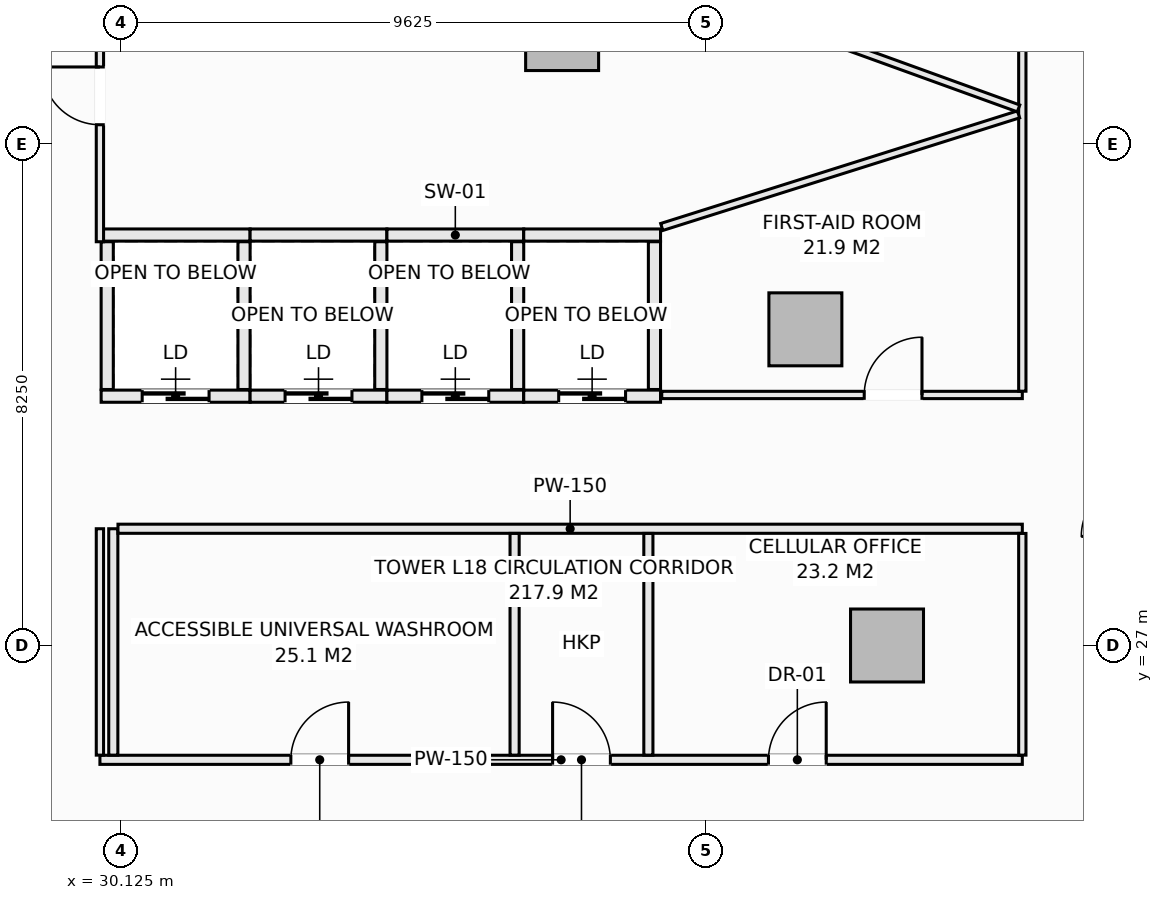
"""IFC4 building model, lengths in metres.
Left out: names, types, materials, properties, quantities, classifications, styles, units other than length and angle.
Written with IfcOpenShell. Run it as: python <this file> out.ifc"""

import sys

from ifc_helpers import new_model, si_unit, direction, frame, frame_2d, origin, origin_2d, place, context, subcontext, project, spatial, rectangle, extrude, element, fill, save


model = new_model("IFC4")
c1 = context("Model", 3, precision=1e-05, world=origin(), true_north=direction((0.0, 1.0)))
c2 = subcontext(c1, "Body", "Model", "MODEL_VIEW")
j1 = project(units=[si_unit("LENGTHUNIT", "METRE"), si_unit("PLANEANGLEUNIT", "RADIAN")], contexts=[c1])
p1 = place(None, origin())
s1 = spatial("IfcSite", under=j1, at=p1, CompositionType="ELEMENT")
p2 = place(p1, origin())
s2 = spatial("IfcBuilding", under=s1, at=p2, CompositionType="ELEMENT")
p3 = place(p2, frame((0.0, 0.0, 76.55)))
s3 = spatial("IfcBuildingStorey", under=s2, at=p3, CompositionType="ELEMENT", Elevation=76.55)
for number, where, z_axis, x_axis in (
    (1, (42.725, 27.0, -0.28), (0.0, 0.0, 1.0), (1.0, 0.0, 0.0)),
    (2, (41.382, 32.199, -0.28), (0.0, 0.0, 1.0), (1.0, 0.0, 0.0)),
    (3, (37.382, 37.055, -0.28), (0.0, 0.0, 1.0), (1.0, 0.0, 0.0)),
):
    element("IfcColumn", number, at=place(p3, frame(where, z_axis=z_axis, x_axis=x_axis)), inside=s3, PredefinedType="COLUMN", context=c2, shape_type="SweptSolid", body=[
        extrude(rectangle(XDim=1.2, YDim=1.2, at=origin_2d()), origin(), (0.0, 0.0, 1.0), 3.85),
    ])
p4 = place(p3, frame((29.8, 33.75, 0.0), z_axis=(0.0, 0.0, 1.0), x_axis=(1.0, 0.0, 0.0)))
e4 = element("IfcWall", 4, at=p4, inside=s3, PredefinedType="SOLIDWALL", context=c2, shape_type="SweptSolid", body=[
    extrude(rectangle(XDim=2.45, YDim=0.2, at=frame_2d((1.225, 0.0))), origin(), (0.0, 0.0, 1.0), 3.57),
])
p5 = place(p3, frame((29.8, 31.1, 0.0), z_axis=(0.0, 0.0, 1.0), x_axis=(1.0, 0.0, 0.0)))
e5 = element("IfcWall", 5, at=p5, inside=s3, PredefinedType="SOLIDWALL", context=c2, shape_type="SweptSolid", body=[
    extrude(rectangle(XDim=2.45, YDim=0.2, at=frame_2d((1.225, 0.0))), origin(), (0.0, 0.0, 1.0), 3.57),
])
p6 = place(p5, frame((0.675, 0.0, 0.0)))
e6 = element("IfcOpeningElement", 6, at=p6, cuts=e5, PredefinedType="OPENING", context=c2, shape_type="SweptSolid", body=[
    extrude(rectangle(XDim=1.1, YDim=2.2, at=frame_2d((0.55, 1.1))), frame((0.0, 0.11, 0.0), z_axis=(0.0, -1.0, 0.0), x_axis=(1.0, 0.0, 0.0)), (0.0, 0.0, 1.0), 0.22),
])
for number, where, z_axis, x_axis in (
    (7, (29.9, 31.21, 0.0), (0.0, 0.0, 1.0), (0.0, 1.0, 0.0)),
    (8, (32.15, 31.21, 0.0), (0.0, 0.0, 1.0), (0.0, 1.0, 0.0)),
):
    element("IfcWall", number, at=place(p3, frame(where, z_axis=z_axis, x_axis=x_axis)), inside=s3, PredefinedType="SOLIDWALL", context=c2, shape_type="SweptSolid", body=[
        extrude(rectangle(XDim=2.43, YDim=0.2, at=frame_2d((1.215, 0.0))), origin(), (0.0, 0.0, 1.0), 3.57),
    ])
p7 = place(p3, frame((32.25, 33.75, 0.0), z_axis=(0.0, 0.0, 1.0), x_axis=(1.0, 0.0, 0.0)))
e9 = element("IfcWall", 9, at=p7, inside=s3, PredefinedType="SOLIDWALL", context=c2, shape_type="SweptSolid", body=[
    extrude(rectangle(XDim=2.25, YDim=0.2, at=frame_2d((1.125, 0.0))), origin(), (0.0, 0.0, 1.0), 3.57),
])
p8 = place(p3, frame((32.25, 31.1, 0.0), z_axis=(0.0, 0.0, 1.0), x_axis=(1.0, 0.0, 0.0)))
e10 = element("IfcWall", 10, at=p8, inside=s3, PredefinedType="SOLIDWALL", context=c2, shape_type="SweptSolid", body=[
    extrude(rectangle(XDim=2.25, YDim=0.2, at=frame_2d((1.125, 0.0))), origin(), (0.0, 0.0, 1.0), 3.57),
])
p9 = place(p8, frame((0.575, 0.0, 0.0)))
e11 = element("IfcOpeningElement", 11, at=p9, cuts=e10, PredefinedType="OPENING", context=c2, shape_type="SweptSolid", body=[
    extrude(rectangle(XDim=1.1, YDim=2.2, at=frame_2d((0.55, 1.1))), frame((0.0, 0.11, 0.0), z_axis=(0.0, -1.0, 0.0), x_axis=(1.0, 0.0, 0.0)), (0.0, 0.0, 1.0), 0.22),
])
p10 = place(p3, frame((34.4, 31.21, 0.0), z_axis=(0.0, 0.0, 1.0), x_axis=(0.0, 1.0, 0.0)))
e12 = element("IfcWall", 12, at=p10, inside=s3, PredefinedType="SOLIDWALL", context=c2, shape_type="SweptSolid", body=[
    extrude(rectangle(XDim=2.43, YDim=0.2, at=frame_2d((1.215, 0.0))), origin(), (0.0, 0.0, 1.0), 3.57),
])
p11 = place(p3, frame((34.5, 33.75, 0.0), z_axis=(0.0, 0.0, 1.0), x_axis=(1.0, 0.0, 0.0)))
e13 = element("IfcWall", 13, at=p11, inside=s3, PredefinedType="SOLIDWALL", context=c2, shape_type="SweptSolid", body=[
    extrude(rectangle(XDim=2.25, YDim=0.2, at=frame_2d((1.125, 0.0))), origin(), (0.0, 0.0, 1.0), 3.57),
])
p12 = place(p3, frame((34.5, 31.1, 0.0), z_axis=(0.0, 0.0, 1.0), x_axis=(1.0, 0.0, 0.0)))
e14 = element("IfcWall", 14, at=p12, inside=s3, PredefinedType="SOLIDWALL", context=c2, shape_type="SweptSolid", body=[
    extrude(rectangle(XDim=2.25, YDim=0.2, at=frame_2d((1.125, 0.0))), origin(), (0.0, 0.0, 1.0), 3.57),
])
p13 = place(p12, frame((0.575, 0.0, 0.0)))
e15 = element("IfcOpeningElement", 15, at=p13, cuts=e14, PredefinedType="OPENING", context=c2, shape_type="SweptSolid", body=[
    extrude(rectangle(XDim=1.1, YDim=2.2, at=frame_2d((0.55, 1.1))), frame((0.0, 0.11, 0.0), z_axis=(0.0, -1.0, 0.0), x_axis=(1.0, 0.0, 0.0)), (0.0, 0.0, 1.0), 0.22),
])
p14 = place(p3, frame((36.65, 31.21, 0.0), z_axis=(0.0, 0.0, 1.0), x_axis=(0.0, 1.0, 0.0)))
e16 = element("IfcWall", 16, at=p14, inside=s3, PredefinedType="SOLIDWALL", context=c2, shape_type="SweptSolid", body=[
    extrude(rectangle(XDim=2.43, YDim=0.2, at=frame_2d((1.215, 0.0))), origin(), (0.0, 0.0, 1.0), 3.57),
])
p15 = place(p3, frame((36.75, 33.75, 0.0), z_axis=(0.0, 0.0, 1.0), x_axis=(1.0, 0.0, 0.0)))
e17 = element("IfcWall", 17, at=p15, inside=s3, PredefinedType="SOLIDWALL", context=c2, shape_type="SweptSolid", body=[
    extrude(rectangle(XDim=2.25, YDim=0.2, at=frame_2d((1.125, 0.0))), origin(), (0.0, 0.0, 1.0), 3.57),
])
p16 = place(p3, frame((36.75, 31.1, 0.0), z_axis=(0.0, 0.0, 1.0), x_axis=(1.0, 0.0, 0.0)))
e18 = element("IfcWall", 18, at=p16, inside=s3, PredefinedType="SOLIDWALL", context=c2, shape_type="SweptSolid", body=[
    extrude(rectangle(XDim=2.25, YDim=0.2, at=frame_2d((1.125, 0.0))), origin(), (0.0, 0.0, 1.0), 3.57),
])
p17 = place(p16, frame((0.575, 0.0, 0.0)))
e19 = element("IfcOpeningElement", 19, at=p17, cuts=e18, PredefinedType="OPENING", context=c2, shape_type="SweptSolid", body=[
    extrude(rectangle(XDim=1.1, YDim=2.2, at=frame_2d((0.55, 1.1))), frame((0.0, 0.11, 0.0), z_axis=(0.0, -1.0, 0.0), x_axis=(1.0, 0.0, 0.0)), (0.0, 0.0, 1.0), 0.22),
])
p18 = place(p3, frame((38.9, 31.21, 0.0), z_axis=(0.0, 0.0, 1.0), x_axis=(0.0, 1.0, 0.0)))
e20 = element("IfcWall", 20, at=p18, inside=s3, PredefinedType="SOLIDWALL", context=c2, shape_type="SweptSolid", body=[
    extrude(rectangle(XDim=2.43, YDim=0.2, at=frame_2d((1.215, 0.0))), origin(), (0.0, 0.0, 1.0), 3.57),
])
p19 = place(p3, frame((29.78, 25.12, 0.0), z_axis=(0.0, 0.0, 1.0), x_axis=(1.0, 0.0, 0.0)))
e21 = element("IfcWall", 21, at=p19, inside=s3, PredefinedType="PARTITIONING", context=c2, shape_type="SweptSolid", body=[
    extrude(rectangle(XDim=15.17, YDim=0.15, at=frame_2d((7.585, 0.0))), origin(), (0.0, 0.0, 1.0), 3.57),
])
p20 = place(p19, frame((3.14, 0.0, 0.0)))
e22 = element("IfcOpeningElement", 22, at=p20, cuts=e21, PredefinedType="OPENING", context=c2, shape_type="SweptSolid", body=[
    extrude(rectangle(XDim=0.95, YDim=2.1, at=frame_2d((0.475, 1.05))), frame((0.0, 0.085, 0.0), z_axis=(0.0, -1.0, 0.0), x_axis=(1.0, 0.0, 0.0)), (0.0, 0.0, 1.0), 0.17),
])
p21 = place(p19, frame((7.445, 0.0, 0.0)))
e23 = element("IfcOpeningElement", 23, at=p21, cuts=e21, PredefinedType="OPENING", context=c2, shape_type="SweptSolid", body=[
    extrude(rectangle(XDim=0.95, YDim=2.1, at=frame_2d((0.475, 1.05))), frame((0.0, 0.085, 0.0), z_axis=(0.0, -1.0, 0.0), x_axis=(1.0, 0.0, 0.0)), (0.0, 0.0, 1.0), 0.17),
])
p22 = place(p19, frame((10.995, 0.0, 0.0)))
e24 = element("IfcOpeningElement", 24, at=p22, cuts=e21, PredefinedType="OPENING", context=c2, shape_type="SweptSolid", body=[
    extrude(rectangle(XDim=0.95, YDim=2.1, at=frame_2d((0.475, 1.05))), frame((0.0, 0.085, 0.0), z_axis=(0.0, -1.0, 0.0), x_axis=(1.0, 0.0, 0.0)), (0.0, 0.0, 1.0), 0.17),
])
p23 = place(p3, frame((30.0, 25.197, 0.0), z_axis=(0.0, 0.0, 1.0), x_axis=(0.0, 1.0, 0.0)))
e25 = element("IfcWall", 25, at=p23, inside=s3, PredefinedType="PARTITIONING", context=c2, shape_type="SweptSolid", body=[
    extrude(rectangle(XDim=3.723, YDim=0.15, at=frame_2d((1.861, 0.0))), origin(), (0.0, 0.0, 1.0), 3.57),
])
p24 = place(p3, frame((30.077, 28.92, 0.0), z_axis=(0.0, 0.0, 1.0), x_axis=(1.0, 0.0, 0.0)))
e26 = element("IfcWall", 26, at=p24, inside=s3, PredefinedType="PARTITIONING", context=c2, shape_type="SweptSolid", body=[
    extrude(rectangle(XDim=14.873, YDim=0.15, at=frame_2d((7.437, 0.0))), origin(), (0.0, 0.0, 1.0), 3.57),
])
for number, where, z_axis, x_axis in (
    (27, (36.6, 25.197, 0.0), (0.0, 0.0, 1.0), (0.0, 1.0, 0.0)),
    (28, (38.8, 25.197, 0.0), (0.0, 0.0, 1.0), (0.0, 1.0, 0.0)),
):
    element("IfcWall", number, at=place(p3, frame(where, z_axis=z_axis, x_axis=x_axis)), inside=s3, PredefinedType="PARTITIONING", context=c2, shape_type="SweptSolid", body=[
        extrude(rectangle(XDim=3.646, YDim=0.15, at=frame_2d((1.823, 0.0))), origin(), (0.0, 0.0, 1.0), 3.57),
    ])
p25 = place(p3, frame((29.78, 25.197, 0.0), z_axis=(0.0, 0.0, 1.0), x_axis=(0.0, 1.0, 0.0)))
e29 = element("IfcWall", 29, at=p25, inside=s3, PredefinedType="PARTITIONING", context=c2, shape_type="SweptSolid", body=[
    extrude(rectangle(XDim=3.723, YDim=0.12, at=frame_2d((1.861, 0.0))), origin(), (0.0, 0.0, 1.0), 3.57),
])
p26 = place(p3, frame((29.78, 33.64, 0.0), z_axis=(0.0, 0.0, 1.0), x_axis=(0.0, 1.0, 0.0)))
e30 = element("IfcWall", 30, at=p26, inside=s3, PredefinedType="PARTITIONING", context=c2, shape_type="SweptSolid", body=[
    extrude(rectangle(XDim=4.798, YDim=0.12, at=frame_2d((2.399, 0.0))), origin(), (0.0, 0.0, 1.0), 3.57),
])
p27 = place(p26, frame((1.924, 0.0, 0.0)))
e31 = element("IfcOpeningElement", 31, at=p27, cuts=e30, PredefinedType="OPENING", context=c2, shape_type="SweptSolid", body=[
    extrude(rectangle(XDim=0.95, YDim=2.1, at=frame_2d((0.475, 1.05))), frame((0.0, 0.07, 0.0), z_axis=(0.0, -1.0, 0.0), x_axis=(1.0, 0.0, 0.0)), (0.0, 0.0, 1.0), 0.14),
])
p28 = place(p3, frame((39.02, 31.12, 0.0), z_axis=(0.0, 0.0, 1.0), x_axis=(1.0, 0.0, 0.0)))
e32 = element("IfcWall", 32, at=p28, inside=s3, PredefinedType="PARTITIONING", context=c2, shape_type="SweptSolid", body=[
    extrude(rectangle(XDim=5.93, YDim=0.12, at=frame_2d((2.965, 0.0))), origin(), (0.0, 0.0, 1.0), 3.57),
])
p29 = place(p28, frame((3.33, 0.0, 0.0)))
e33 = element("IfcOpeningElement", 33, at=p29, cuts=e32, PredefinedType="OPENING", context=c2, shape_type="SweptSolid", body=[
    extrude(rectangle(XDim=0.95, YDim=2.1, at=frame_2d((0.475, 1.05))), frame((0.0, 0.07, 0.0), z_axis=(0.0, -1.0, 0.0), x_axis=(1.0, 0.0, 0.0)), (0.0, 0.0, 1.0), 0.14),
])
p30 = place(p3, frame((44.95, 25.197, 0.0), z_axis=(0.0, 0.0, 1.0), x_axis=(0.0, 1.0, 0.0)))
e34 = element("IfcWall", 34, at=p30, inside=s3, PredefinedType="PARTITIONING", context=c2, shape_type="SweptSolid", body=[
    extrude(rectangle(XDim=3.646, YDim=0.12, at=frame_2d((1.823, 0.0))), origin(), (0.0, 0.0, 1.0), 3.57),
])
p31 = place(p3, frame((44.95, 31.182, 0.0), z_axis=(0.0, 0.0, 1.0), x_axis=(0.0, 1.0, 0.0)))
e35 = element("IfcWall", 35, at=p31, inside=s3, PredefinedType="PARTITIONING", context=c2, shape_type="SweptSolid", body=[
    extrude(rectangle(XDim=6.299, YDim=0.12, at=frame_2d((3.149, 0.0))), origin(), (0.0, 0.0, 1.0), 3.57),
])
p32 = place(p3, frame((45.012, 37.451, 0.0), z_axis=(0.0, 0.0, 1.0), x_axis=(0.901304887575, -0.433185294803, 0.0)))
e36 = element("IfcWall", 36, at=p32, inside=s3, PredefinedType="PARTITIONING", context=c2, shape_type="SweptSolid", body=[
    extrude(rectangle(XDim=2.062, YDim=0.12, at=frame_2d((1.031, 0.0))), origin(), (0.0, 0.0, 1.0), 3.57),
])
p33 = place(p32, frame((0.556, 0.0, 0.0)))
e37 = element("IfcOpeningElement", 37, at=p33, cuts=e36, PredefinedType="OPENING", context=c2, shape_type="SweptSolid", body=[
    extrude(rectangle(XDim=0.95, YDim=2.1, at=frame_2d((0.475, 1.05))), frame((0.0, 0.07, 0.0), z_axis=(0.0, -1.0, 0.0), x_axis=(1.0, 0.0, 0.0)), (0.0, 0.0, 1.0), 0.14),
])
p34 = place(p3, frame((39.02, 33.883, 0.0), z_axis=(0.0, 0.0, 1.0), x_axis=(0.953639615223, 0.300950966568, 0.0)))
e38 = element("IfcWall", 38, at=p34, inside=s3, PredefinedType="PARTITIONING", context=c2, shape_type="SweptSolid", body=[
    extrude(rectangle(XDim=6.153, YDim=0.12, at=frame_2d((3.077, 0.0))), origin(), (0.0, 0.0, 1.0), 3.57),
])
p35 = place(p3, frame((18.06, 45.538, 0.0), z_axis=(0.0, 0.0, 1.0), x_axis=(0.940354559933, -0.340195975304, 0.0)))
e39 = element("IfcWall", 39, at=p35, inside=s3, PredefinedType="PARTITIONING", context=c2, shape_type="SweptSolid", body=[
    extrude(rectangle(XDim=28.53, YDim=0.12, at=frame_2d((14.265, 0.0))), origin(), (0.0, 0.0, 1.0), 3.093),
])
p36 = place(p6, origin())
e40 = element("IfcDoor", 40, at=p36, inside=s3, OperationType="SLIDING_TO_LEFT", PredefinedType="DOOR", context=c2, shape_type="SweptSolid", body=[
    extrude(rectangle(XDim=1.1, YDim=2.2, at=frame_2d((0.55, 1.1))), frame((0.0, 0.025, 0.0), z_axis=(0.0, -1.0, 0.0), x_axis=(1.0, 0.0, 0.0)), (0.0, 0.0, 1.0), 0.05),
])
fill(e6, e40)
p37 = place(p9, origin())
e41 = element("IfcDoor", 41, at=p37, inside=s3, OperationType="SLIDING_TO_LEFT", PredefinedType="DOOR", context=c2, shape_type="SweptSolid", body=[
    extrude(rectangle(XDim=1.1, YDim=2.2, at=frame_2d((0.55, 1.1))), frame((0.0, 0.025, 0.0), z_axis=(0.0, -1.0, 0.0), x_axis=(1.0, 0.0, 0.0)), (0.0, 0.0, 1.0), 0.05),
])
fill(e11, e41)
p38 = place(p13, origin())
e42 = element("IfcDoor", 42, at=p38, inside=s3, OperationType="SLIDING_TO_LEFT", PredefinedType="DOOR", context=c2, shape_type="SweptSolid", body=[
    extrude(rectangle(XDim=1.1, YDim=2.2, at=frame_2d((0.55, 1.1))), frame((0.0, 0.025, 0.0), z_axis=(0.0, -1.0, 0.0), x_axis=(1.0, 0.0, 0.0)), (0.0, 0.0, 1.0), 0.05),
])
fill(e15, e42)
p39 = place(p17, origin())
e43 = element("IfcDoor", 43, at=p39, inside=s3, OperationType="SLIDING_TO_LEFT", PredefinedType="DOOR", context=c2, shape_type="SweptSolid", body=[
    extrude(rectangle(XDim=1.1, YDim=2.2, at=frame_2d((0.55, 1.1))), frame((0.0, 0.025, 0.0), z_axis=(0.0, -1.0, 0.0), x_axis=(1.0, 0.0, 0.0)), (0.0, 0.0, 1.0), 0.05),
])
fill(e19, e43)
p40 = place(p20, origin())
e44 = element("IfcDoor", 44, at=p40, inside=s3, OperationType="SINGLE_SWING_RIGHT", PredefinedType="DOOR", context=c2, shape_type="SweptSolid", body=[
    extrude(rectangle(XDim=0.95, YDim=2.1, at=frame_2d((0.475, 1.05))), frame((0.0, 0.025, 0.0), z_axis=(0.0, -1.0, 0.0), x_axis=(1.0, 0.0, 0.0)), (0.0, 0.0, 1.0), 0.05),
])
fill(e22, e44)
p41 = place(p21, origin())
e45 = element("IfcDoor", 45, at=p41, inside=s3, OperationType="SINGLE_SWING_LEFT", PredefinedType="DOOR", context=c2, shape_type="SweptSolid", body=[
    extrude(rectangle(XDim=0.95, YDim=2.1, at=frame_2d((0.475, 1.05))), frame((0.0, 0.025, 0.0), z_axis=(0.0, -1.0, 0.0), x_axis=(1.0, 0.0, 0.0)), (0.0, 0.0, 1.0), 0.05),
])
fill(e23, e45)
p42 = place(p22, origin())
e46 = element("IfcDoor", 46, at=p42, inside=s3, OperationType="SINGLE_SWING_RIGHT", PredefinedType="DOOR", context=c2, shape_type="SweptSolid", body=[
    extrude(rectangle(XDim=0.95, YDim=2.1, at=frame_2d((0.475, 1.05))), frame((0.0, 0.025, 0.0), z_axis=(0.0, -1.0, 0.0), x_axis=(1.0, 0.0, 0.0)), (0.0, 0.0, 1.0), 0.05),
])
fill(e24, e46)
p43 = place(p29, origin())
e47 = element("IfcDoor", 47, at=p43, inside=s3, OperationType="SINGLE_SWING_RIGHT", PredefinedType="DOOR", context=c2, shape_type="SweptSolid", body=[
    extrude(rectangle(XDim=0.95, YDim=2.1, at=frame_2d((0.475, 1.05))), frame((0.0, 0.025, 0.0), z_axis=(0.0, -1.0, 0.0), x_axis=(1.0, 0.0, 0.0)), (0.0, 0.0, 1.0), 0.05),
])
fill(e33, e47)
p44 = place(p27, origin())
e48 = element("IfcDoor", 48, at=p44, inside=s3, OperationType="SINGLE_SWING_RIGHT", PredefinedType="DOOR", context=c2, shape_type="SweptSolid", body=[
    extrude(rectangle(XDim=0.95, YDim=2.1, at=frame_2d((0.475, 1.05))), frame((0.0, 0.025, 0.0), z_axis=(0.0, -1.0, 0.0), x_axis=(1.0, 0.0, 0.0)), (0.0, 0.0, 1.0), 0.05),
])
fill(e31, e48)
save(model, sys.argv[1])
